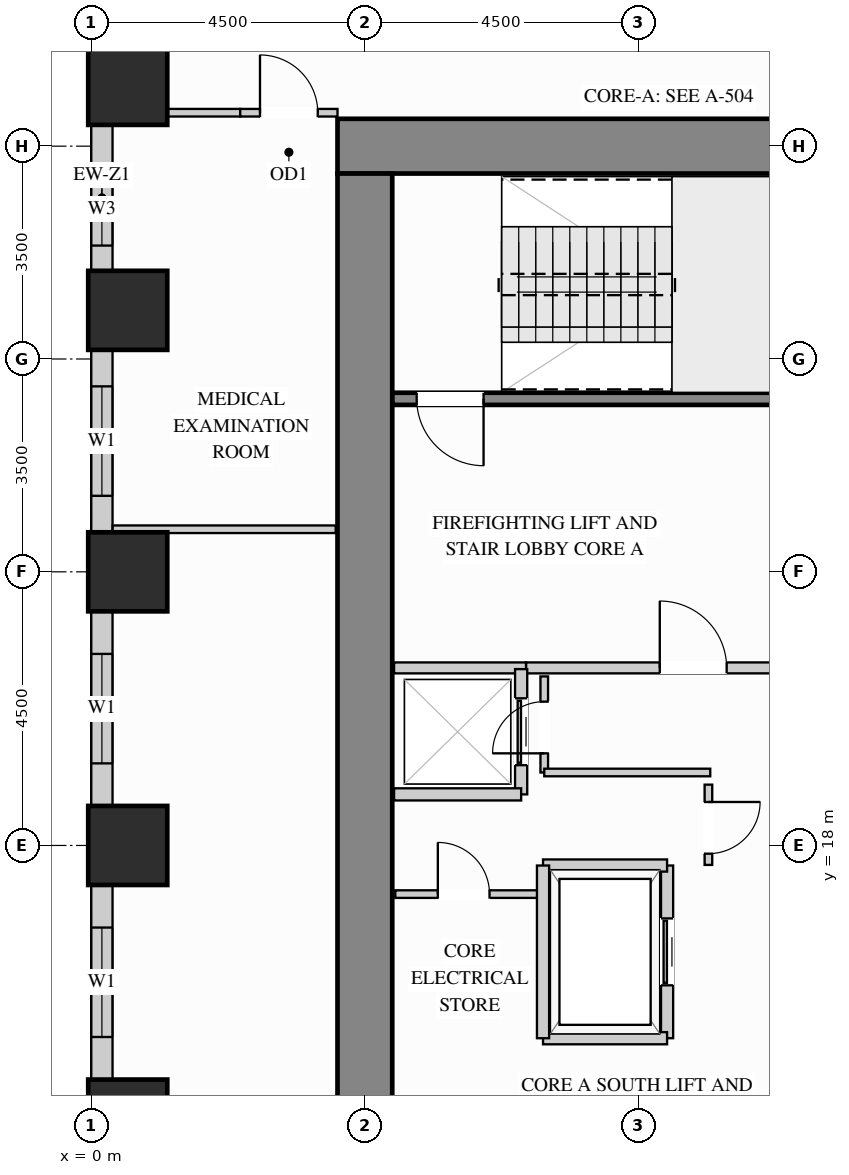
"""IFC4 building model, lengths in metres.
Left out: names, types, materials, properties, quantities, classifications, styles, units other than length and angle.
Written with IfcOpenShell. Run it as: python <this file> out.ifc"""

import sys

from ifc_helpers import new_model, si_unit, direction, frame, frame_2d, origin, origin_2d, place, context, subcontext, project, spatial, rectangle, extrude, source, transform, mapped, element, fill, save


model = new_model("IFC4")
c1 = context("Model", 3, precision=1e-05, world=origin(), true_north=direction((0.0, 1.0)))
c2 = subcontext(c1, "Body", "Model", "MODEL_VIEW")
j1 = project(units=[si_unit("LENGTHUNIT", "METRE"), si_unit("PLANEANGLEUNIT", "RADIAN")], contexts=[c1])
p1 = place(None, origin())
s1 = spatial("IfcSite", under=j1, at=p1, CompositionType="ELEMENT")
p2 = place(p1, origin())
s2 = spatial("IfcBuilding", under=s1, at=p2, CompositionType="ELEMENT")
p3 = place(p2, frame((0.0, 0.0, 54.9)))
s3 = spatial("IfcBuildingStorey", under=s2, at=p3, CompositionType="ELEMENT", Elevation=54.9)
m1 = source(origin(), c2, "Body", "SweptSolid", [
    extrude(rectangle(XDim=1.3, YDim=1.3, at=origin_2d()), origin(), (0.0, 0.0, 1.0), 3.38),
])
for number, where, z_axis, x_axis in (
    (1, (0.6, 13.5, 0.0), (0.0, 0.0, 1.0), (1.0, 0.0, 0.0)),
    (2, (0.6, 18.0, 0.0), (0.0, 0.0, 1.0), (1.0, 0.0, 0.0)),
    (3, (0.6, 22.5, 0.0), (0.0, 0.0, 1.0), (1.0, 0.0, 0.0)),
    (4, (0.6, 26.8, 0.0), (0.0, 0.0, 1.0), (1.0, 0.0, 0.0)),
    (5, (0.6, 30.5, 0.0), (0.0, 0.0, 1.0), (1.0, 0.0, 0.0)),
):
    element("IfcColumn", number, at=place(p3, frame(where, z_axis=z_axis, x_axis=x_axis)), inside=s3, PredefinedType="COLUMN", context=c2, shape_type="MappedRepresentation", body=[
        mapped(m1, transform((0.0, 0.0, 0.0), x_axis=(1.0, 0.0, 0.0), y_axis=(0.0, 1.0, 0.0), z_axis=(0.0, 0.0, 1.0))),
    ])
m2 = source(origin(), c2, "Body", "SweptSolid", [
    extrude(rectangle(XDim=10.9, YDim=0.9, at=frame_2d((5.45, 0.0))), origin(), (0.0, 0.0, 1.0), 3.38),
])
p4 = place(p3, frame((4.05, 29.5, 0.0), z_axis=(0.0, 0.0, 1.0), x_axis=(1.0, 0.0, 0.0)))
e6 = element("IfcWall", 6, at=p4, inside=s3, PredefinedType="SHEAR", context=c2, shape_type="MappedRepresentation", body=[
    mapped(m2, transform((0.0, 0.0, 0.0), x_axis=(1.0, 0.0, 0.0), y_axis=(0.0, 1.0, 0.0), z_axis=(0.0, 0.0, 1.0))),
])
m3 = source(origin(), c2, "Body", "SweptSolid", [
    extrude(rectangle(XDim=20.1, YDim=0.9, at=frame_2d((10.05, 0.0))), origin(), (0.0, 0.0, 1.0), 3.38),
])
p5 = place(p3, frame((4.5, 8.95, 0.0), z_axis=(0.0, 0.0, 1.0), x_axis=(0.0, 1.0, 0.0)))
e7 = element("IfcWall", 7, at=p5, inside=s3, PredefinedType="SHEAR", context=c2, shape_type="MappedRepresentation", body=[
    mapped(m3, transform((0.0, 0.0, 0.0), x_axis=(1.0, 0.0, 0.0), y_axis=(0.0, 1.0, 0.0), z_axis=(0.0, 0.0, 1.0))),
])
p6 = place(p3, frame((0.175, 29.852, 0.0), z_axis=(0.0, 0.0, 1.0), x_axis=(0.0, -1.0, 0.0)))
e8 = element("IfcWall", 8, at=p6, inside=s3, PredefinedType="SOLIDWALL", context=c2, shape_type="SweptSolid", body=[
    extrude(rectangle(XDim=2.404, YDim=0.35, at=frame_2d((1.202, 0.0))), origin(), (0.0, 0.0, 1.0), 2.51),
])
p7 = place(p6, frame((0.787, 0.0, 0.78)))
e9 = element("IfcOpeningElement", 9, at=p7, cuts=e8, PredefinedType="OPENING", context=c2, shape_type="SweptSolid", body=[
    extrude(rectangle(XDim=1.2, YDim=1.55, at=frame_2d((0.6, 0.775))), frame((0.0, 0.185, 0.0), z_axis=(0.0, -1.0, 0.0), x_axis=(1.0, 0.0, 0.0)), (0.0, 0.0, 1.0), 0.37),
])
p8 = place(p3, frame((0.175, 26.152, 0.0), z_axis=(0.0, 0.0, 1.0), x_axis=(0.0, -1.0, 0.0)))
e10 = element("IfcWall", 10, at=p8, inside=s3, PredefinedType="SOLIDWALL", context=c2, shape_type="SweptSolid", body=[
    extrude(rectangle(XDim=3.004, YDim=0.35, at=frame_2d((1.502, 0.0))), origin(), (0.0, 0.0, 1.0), 2.51),
])
p9 = place(p8, frame((0.602, 0.0, 0.78)))
e11 = element("IfcOpeningElement", 11, at=p9, cuts=e10, PredefinedType="OPENING", context=c2, shape_type="SweptSolid", body=[
    extrude(rectangle(XDim=1.8, YDim=1.55, at=frame_2d((0.9, 0.775))), frame((0.0, 0.185, 0.0), z_axis=(0.0, -1.0, 0.0), x_axis=(1.0, 0.0, 0.0)), (0.0, 0.0, 1.0), 0.37),
])
p10 = place(p3, frame((0.175, 21.852, 0.0), z_axis=(0.0, 0.0, 1.0), x_axis=(0.0, -1.0, 0.0)))
e12 = element("IfcWall", 12, at=p10, inside=s3, PredefinedType="SOLIDWALL", context=c2, shape_type="SweptSolid", body=[
    extrude(rectangle(XDim=3.204, YDim=0.35, at=frame_2d((1.602, 0.0))), origin(), (0.0, 0.0, 1.0), 2.51),
])
p11 = place(p10, frame((0.702, 0.0, 0.78)))
e13 = element("IfcOpeningElement", 13, at=p11, cuts=e12, PredefinedType="OPENING", context=c2, shape_type="SweptSolid", body=[
    extrude(rectangle(XDim=1.8, YDim=1.55, at=frame_2d((0.9, 0.775))), frame((0.0, 0.185, 0.0), z_axis=(0.0, -1.0, 0.0), x_axis=(1.0, 0.0, 0.0)), (0.0, 0.0, 1.0), 0.37),
])
p12 = place(p3, frame((0.175, 17.352, 0.0), z_axis=(0.0, 0.0, 1.0), x_axis=(0.0, -1.0, 0.0)))
e14 = element("IfcWall", 14, at=p12, inside=s3, PredefinedType="SOLIDWALL", context=c2, shape_type="SweptSolid", body=[
    extrude(rectangle(XDim=3.204, YDim=0.35, at=frame_2d((1.602, 0.0))), origin(), (0.0, 0.0, 1.0), 2.51),
])
p13 = place(p12, frame((0.702, 0.0, 0.78)))
e15 = element("IfcOpeningElement", 15, at=p13, cuts=e14, PredefinedType="OPENING", context=c2, shape_type="SweptSolid", body=[
    extrude(rectangle(XDim=1.8, YDim=1.55, at=frame_2d((0.9, 0.775))), frame((0.0, 0.185, 0.0), z_axis=(0.0, -1.0, 0.0), x_axis=(1.0, 0.0, 0.0)), (0.0, 0.0, 1.0), 0.37),
])
p14 = place(p3, frame((7.15, 20.92, 0.0), z_axis=(0.0, 0.0, 1.0), x_axis=(1.0, 0.0, 0.0)))
e16 = element("IfcWall", 16, at=p14, inside=s3, PredefinedType="PARTITIONING", context=c2, shape_type="SweptSolid", body=[
    extrude(rectangle(XDim=4.68, YDim=0.18, at=frame_2d((2.34, 0.0))), origin(), (0.0, 0.0, 1.0), 3.365),
])
p15 = place(p14, frame((2.2, 0.0, 0.0)))
e17 = element("IfcOpeningElement", 17, at=p15, cuts=e16, PredefinedType="OPENING", context=c2, shape_type="SweptSolid", body=[
    extrude(rectangle(XDim=1.1, YDim=2.15, at=frame_2d((0.55, 1.075))), frame((0.0, 0.1, 0.0), z_axis=(0.0, -1.0, 0.0), x_axis=(1.0, 0.0, 0.0)), (0.0, 0.0, 1.0), 0.2),
])
m4 = source(origin(), c2, "Body", "SweptSolid", [
    extrude(rectangle(XDim=2.17, YDim=0.18, at=frame_2d((1.085, 0.0))), origin(), (0.0, 0.0, 1.0), 3.365),
])
p16 = place(p3, frame((4.98, 20.92, 0.0), z_axis=(0.0, 0.0, 1.0), x_axis=(1.0, 0.0, 0.0)))
e18 = element("IfcWall", 18, at=p16, inside=s3, PredefinedType="PARTITIONING", context=c2, shape_type="MappedRepresentation", body=[
    mapped(m4, transform((0.0, 0.0, 0.0), x_axis=(1.0, 0.0, 0.0), y_axis=(0.0, 1.0, 0.0), z_axis=(0.0, 0.0, 1.0))),
])
p17 = place(p3, frame((10.15, 17.68, 0.0), z_axis=(0.0, 0.0, 1.0), x_axis=(0.0, 1.0, 0.0)))
e19 = element("IfcWall", 19, at=p17, inside=s3, PredefinedType="PARTITIONING", context=c2, shape_type="SweptSolid", body=[
    extrude(rectangle(XDim=1.32, YDim=0.125, at=frame_2d((0.66, 0.0))), origin(), (0.0, 0.0, 1.0), 3.365),
])
p18 = place(p17, frame((0.185, 0.0, 0.0)))
e20 = element("IfcOpeningElement", 20, at=p18, cuts=e19, PredefinedType="OPENING", context=c2, shape_type="SweptSolid", body=[
    extrude(rectangle(XDim=0.85, YDim=2.1, at=frame_2d((0.425, 1.05))), frame((0.0, 0.073, 0.0), z_axis=(0.0, -1.0, 0.0), x_axis=(1.0, 0.0, 0.0)), (0.0, 0.0, 1.0), 0.145),
])
p19 = place(p3, frame((7.45, 19.2, 0.0), z_axis=(0.0, 0.0, 1.0), x_axis=(0.0, 1.0, 0.0)))
e21 = element("IfcWall", 21, at=p19, inside=s3, PredefinedType="PARTITIONING", context=c2, shape_type="SweptSolid", body=[
    extrude(rectangle(XDim=1.58, YDim=0.125, at=frame_2d((0.79, 0.0))), origin(), (0.0, 0.0, 1.0), 3.365),
])
p20 = place(p19, frame((0.315, 0.0, 0.0)))
e22 = element("IfcOpeningElement", 22, at=p20, cuts=e21, PredefinedType="OPENING", context=c2, shape_type="SweptSolid", body=[
    extrude(rectangle(XDim=0.85, YDim=2.1, at=frame_2d((0.425, 1.05))), frame((0.0, 0.073, 0.0), z_axis=(0.0, -1.0, 0.0), x_axis=(1.0, 0.0, 0.0)), (0.0, 0.0, 1.0), 0.145),
])
m5 = source(origin(), c2, "Body", "SweptSolid", [
    extrude(rectangle(XDim=2.73, YDim=0.125, at=frame_2d((1.365, 0.0))), origin(), (0.0, 0.0, 1.0), 3.365),
])
p21 = place(p3, frame((7.45, 19.2, 0.0), z_axis=(0.0, 0.0, 1.0), x_axis=(1.0, 0.0, 0.0)))
e23 = element("IfcWall", 23, at=p21, inside=s3, PredefinedType="PARTITIONING", context=c2, shape_type="MappedRepresentation", body=[
    mapped(m5, transform((0.0, 0.0, 0.0), x_axis=(1.0, 0.0, 0.0), y_axis=(0.0, 1.0, 0.0), z_axis=(0.0, 0.0, 1.0))),
])
p22 = place(p3, frame((5.0, 17.2, 0.0), z_axis=(0.0, 0.0, 1.0), x_axis=(1.0, 0.0, 0.0)))
e24 = element("IfcWall", 24, at=p22, inside=s3, PredefinedType="PARTITIONING", context=c2, shape_type="SweptSolid", body=[
    extrude(rectangle(XDim=2.4, YDim=0.125, at=frame_2d((1.2, 0.0))), origin(), (0.0, 0.0, 1.0), 3.365),
])
p23 = place(p22, frame((0.7, 0.0, 0.0)))
e25 = element("IfcOpeningElement", 25, at=p23, cuts=e24, PredefinedType="OPENING", context=c2, shape_type="SweptSolid", body=[
    extrude(rectangle(XDim=0.85, YDim=2.1, at=frame_2d((0.425, 1.05))), frame((0.0, 0.073, 0.0), z_axis=(0.0, -1.0, 0.0), x_axis=(1.0, 0.0, 0.0)), (0.0, 0.0, 1.0), 0.145),
])
m6 = source(origin(), c2, "Body", "SweptSolid", [
    extrude(rectangle(XDim=1.19, YDim=0.125, at=frame_2d((0.595, 0.0))), origin(), (0.0, 0.0, 1.0), 3.365),
])
p24 = place(p3, frame((1.26, 30.05, 0.0), z_axis=(0.0, 0.0, 1.0), x_axis=(1.0, 0.0, 0.0)))
e26 = element("IfcWall", 26, at=p24, inside=s3, PredefinedType="PARTITIONING", context=c2, shape_type="MappedRepresentation", body=[
    mapped(m6, transform((0.0, 0.0, 0.0), x_axis=(1.0, 0.0, 0.0), y_axis=(0.0, 1.0, 0.0), z_axis=(0.0, 0.0, 1.0))),
])
p25 = place(p3, frame((2.45, 30.05, 0.0), z_axis=(0.0, 0.0, 1.0), x_axis=(1.0, 0.0, 0.0)))
e27 = element("IfcWall", 27, at=p25, inside=s3, PredefinedType="PARTITIONING", context=c2, shape_type="SweptSolid", body=[
    extrude(rectangle(XDim=1.6, YDim=0.125, at=frame_2d((0.8, 0.0))), origin(), (0.0, 0.0, 1.0), 3.365),
])
p26 = place(p25, frame((0.325, 0.0, 0.0)))
e28 = element("IfcOpeningElement", 28, at=p26, cuts=e27, PredefinedType="OPENING", context=c2, shape_type="SweptSolid", body=[
    extrude(rectangle(XDim=0.95, YDim=2.15, at=frame_2d((0.475, 1.075))), frame((0.0, 0.073, 0.0), z_axis=(0.0, -1.0, 0.0), x_axis=(1.0, 0.0, 0.0)), (0.0, 0.0, 1.0), 0.145),
])
m7 = source(origin(), c2, "Body", "SweptSolid", [
    extrude(rectangle(XDim=3.668, YDim=0.125, at=frame_2d((1.834, 0.0))), origin(), (0.0, 0.0, 1.0), 3.365),
])
p27 = place(p3, frame((0.352, 23.2, 0.0), z_axis=(0.0, 0.0, 1.0), x_axis=(1.0, 0.0, 0.0)))
e29 = element("IfcWall", 29, at=p27, inside=s3, PredefinedType="PARTITIONING", context=c2, shape_type="MappedRepresentation", body=[
    mapped(m7, transform((0.0, 0.0, 0.0), x_axis=(1.0, 0.0, 0.0), y_axis=(0.0, 1.0, 0.0), z_axis=(0.0, 0.0, 1.0))),
])
p28 = place(p3, frame((7.07, 18.84, 0.0), z_axis=(0.0, 0.0, 1.0), x_axis=(0.0, 1.0, 0.0)))
e30 = element("IfcWall", 30, at=p28, inside=s3, PredefinedType="PARTITIONING", context=c2, shape_type="SweptSolid", body=[
    extrude(rectangle(XDim=2.06, YDim=0.2, at=frame_2d((1.03, 0.0))), origin(), (0.0, 0.0, 1.0), 3.365),
])
p29 = place(p28, frame((0.48, 0.0, 0.0)))
e31 = element("IfcOpeningElement", 31, at=p29, cuts=e30, PredefinedType="OPENING", context=c2, shape_type="SweptSolid", body=[
    extrude(rectangle(XDim=1.1, YDim=2.2, at=frame_2d((0.55, 1.1))), frame((0.0, 0.11, 0.0), z_axis=(0.0, -1.0, 0.0), x_axis=(1.0, 0.0, 0.0)), (0.0, 0.0, 1.0), 0.22),
])
m8 = source(origin(), c2, "Body", "SweptSolid", [
    extrude(rectangle(XDim=2.09, YDim=0.2, at=frame_2d((1.045, 0.0))), origin(), (0.0, 0.0, 1.0), 3.365),
])
p30 = place(p3, frame((4.98, 18.84, 0.0), z_axis=(0.0, 0.0, 1.0), x_axis=(1.0, 0.0, 0.0)))
e32 = element("IfcWall", 32, at=p30, inside=s3, PredefinedType="PARTITIONING", context=c2, shape_type="MappedRepresentation", body=[
    mapped(m8, transform((0.0, 0.0, 0.0), x_axis=(1.0, 0.0, 0.0), y_axis=(0.0, 1.0, 0.0), z_axis=(0.0, 0.0, 1.0))),
])
p31 = place(p3, frame((9.47, 14.83, 0.0), z_axis=(0.0, 0.0, 1.0), x_axis=(0.0, 1.0, 0.0)))
e33 = element("IfcWall", 33, at=p31, inside=s3, PredefinedType="PARTITIONING", context=c2, shape_type="SweptSolid", body=[
    extrude(rectangle(XDim=2.84, YDim=0.2, at=frame_2d((1.42, 0.0))), origin(), (0.0, 0.0, 1.0), 3.365),
])
p32 = place(p31, frame((0.87, 0.0, 0.0)))
e34 = element("IfcOpeningElement", 34, at=p32, cuts=e33, PredefinedType="OPENING", context=c2, shape_type="SweptSolid", body=[
    extrude(rectangle(XDim=1.1, YDim=2.2, at=frame_2d((0.55, 1.1))), frame((0.0, 0.11, 0.0), z_axis=(0.0, -1.0, 0.0), x_axis=(1.0, 0.0, 0.0)), (0.0, 0.0, 1.0), 0.22),
])
m9 = source(origin(), c2, "Body", "SweptSolid", [
    extrude(rectangle(XDim=2.04, YDim=0.2, at=frame_2d((1.02, 0.0))), origin(), (0.0, 0.0, 1.0), 3.365),
])
for number, where, z_axis, x_axis in (
    (35, (7.43, 17.67, 0.0), (0.0, 0.0, 1.0), (1.0, 0.0, 0.0)),
    (36, (7.43, 14.83, 0.0), (0.0, 0.0, 1.0), (1.0, 0.0, 0.0)),
):
    element("IfcWall", number, at=place(p3, frame(where, z_axis=z_axis, x_axis=x_axis)), inside=s3, PredefinedType="PARTITIONING", context=c2, shape_type="MappedRepresentation", body=[
        mapped(m9, transform((0.0, 0.0, 0.0), x_axis=(1.0, 0.0, 0.0), y_axis=(0.0, 1.0, 0.0), z_axis=(0.0, 0.0, 1.0))),
    ])
m10 = source(origin(), c2, "Body", "SweptSolid", [
    extrude(rectangle(XDim=2.84, YDim=0.2, at=frame_2d((1.42, 0.0))), origin(), (0.0, 0.0, 1.0), 3.365),
])
p33 = place(p3, frame((7.43, 14.83, 0.0), z_axis=(0.0, 0.0, 1.0), x_axis=(0.0, 1.0, 0.0)))
e37 = element("IfcWall", 37, at=p33, inside=s3, PredefinedType="PARTITIONING", context=c2, shape_type="MappedRepresentation", body=[
    mapped(m10, transform((0.0, 0.0, 0.0), x_axis=(1.0, 0.0, 0.0), y_axis=(0.0, 1.0, 0.0), z_axis=(0.0, 0.0, 1.0))),
])
p34 = place(p3, frame((4.952, 25.345, 0.0), z_axis=(0.0, 0.0, 1.0), x_axis=(1.0, 0.0, 0.0)))
e38 = element("IfcWall", 38, at=p34, inside=s3, PredefinedType="SHEAR", context=c2, shape_type="SweptSolid", body=[
    extrude(rectangle(XDim=7.453, YDim=0.2, at=frame_2d((3.727, 0.0))), origin(), (0.0, 0.0, 1.0), 3.38),
])
p35 = place(p34, frame((0.4, 0.0, 0.0)))
e39 = element("IfcOpeningElement", 39, at=p35, cuts=e38, PredefinedType="OPENING", context=c2, shape_type="SweptSolid", body=[
    extrude(rectangle(XDim=1.1, YDim=2.15, at=frame_2d((0.55, 1.075))), frame((0.0, 0.11, 0.0), z_axis=(0.0, -1.0, 0.0), x_axis=(1.0, 0.0, 0.0)), (0.0, 0.0, 1.0), 0.22),
])
m11 = source(origin(), c2, "Body", "SweptSolid", [
    extrude(rectangle(XDim=1.1, YDim=2.15, at=frame_2d((0.55, 1.075))), frame((0.0, 0.025, 0.0), z_axis=(0.0, -1.0, 0.0), x_axis=(1.0, 0.0, 0.0)), (0.0, 0.0, 1.0), 0.05),
])
p36 = place(p15, origin())
e40 = element("IfcDoor", 40, at=p36, inside=s3, OperationType="SINGLE_SWING_LEFT", PredefinedType="DOOR", context=c2, shape_type="MappedRepresentation", body=[
    mapped(m11, transform((0.0, 0.0, 0.0), x_axis=(1.0, 0.0, 0.0), y_axis=(0.0, 1.0, 0.0), z_axis=(0.0, 0.0, 1.0))),
])
fill(e17, e40)
m12 = source(origin(), c2, "Body", "SweptSolid", [
    extrude(rectangle(XDim=1.1, YDim=2.2, at=frame_2d((0.55, 1.1))), frame((0.0, 0.025, 0.0), z_axis=(0.0, -1.0, 0.0), x_axis=(1.0, 0.0, 0.0)), (0.0, 0.0, 1.0), 0.05),
])
p37 = place(p29, origin())
e41 = element("IfcDoor", 41, at=p37, inside=s3, OperationType="SLIDING_TO_LEFT", PredefinedType="DOOR", context=c2, shape_type="MappedRepresentation", body=[
    mapped(m12, transform((0.0, 0.0, 0.0), x_axis=(1.0, 0.0, 0.0), y_axis=(0.0, 1.0, 0.0), z_axis=(0.0, 0.0, 1.0))),
])
fill(e31, e41)
p38 = place(p32, origin())
e42 = element("IfcDoor", 42, at=p38, inside=s3, OperationType="SLIDING_TO_LEFT", PredefinedType="DOOR", context=c2, shape_type="MappedRepresentation", body=[
    mapped(m12, transform((0.0, 0.0, 0.0), x_axis=(1.0, 0.0, 0.0), y_axis=(0.0, 1.0, 0.0), z_axis=(0.0, 0.0, 1.0))),
])
fill(e34, e42)
m13 = source(origin(), c2, "Body", "SweptSolid", [
    extrude(rectangle(XDim=0.95, YDim=2.15, at=frame_2d((0.475, 1.075))), frame((0.0, 0.025, 0.0), z_axis=(0.0, -1.0, 0.0), x_axis=(1.0, 0.0, 0.0)), (0.0, 0.0, 1.0), 0.05),
])
p39 = place(p26, origin())
e43 = element("IfcDoor", 43, at=p39, inside=s3, OperationType="SINGLE_SWING_LEFT", PredefinedType="DOOR", context=c2, shape_type="MappedRepresentation", body=[
    mapped(m13, transform((0.0, 0.0, 0.0), x_axis=(1.0, 0.0, 0.0), y_axis=(0.0, 1.0, 0.0), z_axis=(0.0, 0.0, 1.0))),
])
fill(e28, e43)
m14 = source(origin(), c2, "Body", "SweptSolid", [
    extrude(rectangle(XDim=0.85, YDim=2.1, at=frame_2d((0.425, 1.05))), frame((0.0, 0.025, 0.0), z_axis=(0.0, -1.0, 0.0), x_axis=(1.0, 0.0, 0.0)), (0.0, 0.0, 1.0), 0.05),
])
p40 = place(p18, origin())
e44 = element("IfcDoor", 44, at=p40, inside=s3, OperationType="SINGLE_SWING_RIGHT", PredefinedType="DOOR", context=c2, shape_type="MappedRepresentation", body=[
    mapped(m14, transform((0.0, 0.0, 0.0), x_axis=(1.0, 0.0, 0.0), y_axis=(0.0, 1.0, 0.0), z_axis=(0.0, 0.0, 1.0))),
])
fill(e20, e44)
p41 = place(p23, origin())
e45 = element("IfcDoor", 45, at=p41, inside=s3, OperationType="SINGLE_SWING_LEFT", PredefinedType="DOOR", context=c2, shape_type="MappedRepresentation", body=[
    mapped(m14, transform((0.0, 0.0, 0.0), x_axis=(1.0, 0.0, 0.0), y_axis=(0.0, 1.0, 0.0), z_axis=(0.0, 0.0, 1.0))),
])
fill(e25, e45)
p42 = place(p20, origin())
e46 = element("IfcDoor", 46, at=p42, inside=s3, OperationType="SINGLE_SWING_LEFT", PredefinedType="DOOR", context=c2, shape_type="MappedRepresentation", body=[
    mapped(m14, transform((0.0, 0.0, 0.0), x_axis=(1.0, 0.0, 0.0), y_axis=(0.0, 1.0, 0.0), z_axis=(0.0, 0.0, 1.0))),
])
fill(e22, e46)
m15 = source(origin(), c2, "Body", "SweptSolid", [
    extrude(rectangle(XDim=1.1, YDim=2.15, at=frame_2d((0.55, 1.075))), frame((0.0, 0.025, 0.0), z_axis=(0.0, -1.0, 0.0), x_axis=(1.0, 0.0, 0.0)), (0.0, 0.0, 1.0), 0.05),
])
p43 = place(p35, origin())
e47 = element("IfcDoor", 47, at=p43, inside=s3, OperationType="SINGLE_SWING_RIGHT", PredefinedType="DOOR", context=c2, shape_type="MappedRepresentation", body=[
    mapped(m15, transform((0.0, 0.0, 0.0), x_axis=(1.0, 0.0, 0.0), y_axis=(0.0, 1.0, 0.0), z_axis=(0.0, 0.0, 1.0))),
])
fill(e39, e47)
m16 = source(origin(), c2, "Body", "SweptSolid", [
    extrude(rectangle(XDim=1.8, YDim=1.55, at=frame_2d((0.9, 0.775))), frame((0.0, 0.03, 0.0), z_axis=(0.0, -1.0, 0.0), x_axis=(1.0, 0.0, 0.0)), (0.0, 0.0, 1.0), 0.06),
])
p44 = place(p9, origin())
e48 = element("IfcWindow", 48, at=p44, inside=s3, PartitioningType="SINGLE_PANEL", PredefinedType="WINDOW", context=c2, shape_type="MappedRepresentation", body=[
    mapped(m16, transform((0.0, 0.0, 0.0), x_axis=(1.0, 0.0, 0.0), y_axis=(0.0, 1.0, 0.0), z_axis=(0.0, 0.0, 1.0))),
])
fill(e11, e48)
p45 = place(p11, origin())
e49 = element("IfcWindow", 49, at=p45, inside=s3, PartitioningType="SINGLE_PANEL", PredefinedType="WINDOW", context=c2, shape_type="MappedRepresentation", body=[
    mapped(m16, transform((0.0, 0.0, 0.0), x_axis=(1.0, 0.0, 0.0), y_axis=(0.0, 1.0, 0.0), z_axis=(0.0, 0.0, 1.0))),
])
fill(e13, e49)
p46 = place(p13, origin())
e50 = element("IfcWindow", 50, at=p46, inside=s3, PartitioningType="SINGLE_PANEL", PredefinedType="WINDOW", context=c2, shape_type="MappedRepresentation", body=[
    mapped(m16, transform((0.0, 0.0, 0.0), x_axis=(1.0, 0.0, 0.0), y_axis=(0.0, 1.0, 0.0), z_axis=(0.0, 0.0, 1.0))),
])
fill(e15, e50)
m17 = source(origin(), c2, "Body", "SweptSolid", [
    extrude(rectangle(XDim=1.2, YDim=1.55, at=frame_2d((0.6, 0.775))), frame((0.0, 0.03, 0.0), z_axis=(0.0, -1.0, 0.0), x_axis=(1.0, 0.0, 0.0)), (0.0, 0.0, 1.0), 0.06),
])
p47 = place(p7, origin())
e51 = element("IfcWindow", 51, at=p47, inside=s3, PartitioningType="SINGLE_PANEL", PredefinedType="WINDOW", context=c2, shape_type="MappedRepresentation", body=[
    mapped(m17, transform((0.0, 0.0, 0.0), x_axis=(1.0, 0.0, 0.0), y_axis=(0.0, 1.0, 0.0), z_axis=(0.0, 0.0, 1.0))),
])
fill(e9, e51)
save(model, sys.argv[1])
